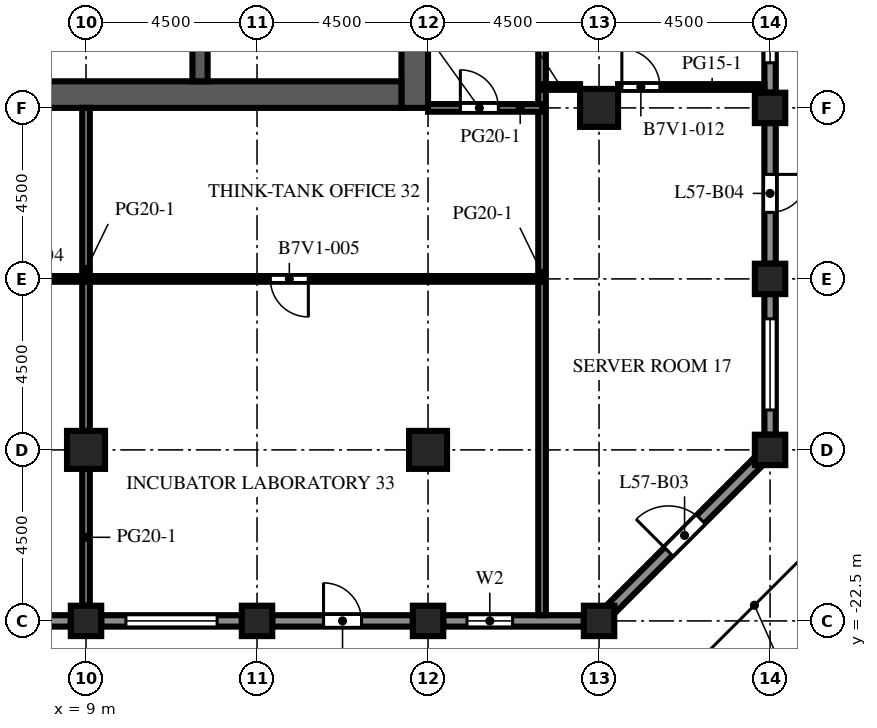
"""IFC4 building model, lengths in metres.
Left out: names, types, materials, properties, quantities, classifications, styles, units other than length and angle.
Written with IfcOpenShell. Run it as: python <this file> out.ifc"""

import sys

from ifc_helpers import new_model, si_unit, direction, frame, frame_2d, origin, origin_2d, place, context, subcontext, project, spatial, rectangle, extrude, element, fill, save


model = new_model("IFC4")
c1 = context("Model", 3, precision=1e-05, world=origin(), true_north=direction((0.0, 1.0)))
c2 = subcontext(c1, "Body", "Model", "MODEL_VIEW")
j1 = project(units=[si_unit("LENGTHUNIT", "METRE"), si_unit("PLANEANGLEUNIT", "RADIAN")], contexts=[c1])
p1 = place(None, origin())
s1 = spatial("IfcSite", under=j1, at=p1, CompositionType="ELEMENT")
p2 = place(p1, origin())
s2 = spatial("IfcBuilding", under=s1, at=p2, CompositionType="ELEMENT")
p3 = place(p2, frame((0.0, 0.0, 252.1)))
s3 = spatial("IfcBuildingStorey", under=s2, at=p3, CompositionType="ELEMENT", Elevation=252.1)
for number, where, z_axis, x_axis in (
    (1, (9.0, -22.5, 0.0), (0.0, 0.0, 1.0), (1.0, 0.0, 0.0)),
    (2, (13.5, -22.5, 0.0), (0.0, 0.0, 1.0), (1.0, 0.0, 0.0)),
    (3, (18.0, -22.5, 0.0), (0.0, 0.0, 1.0), (1.0, 0.0, 0.0)),
    (4, (22.5, -22.5, 0.0), (0.0, 0.0, 1.0), (1.0, 0.0, 0.0)),
    (5, (27.0, -18.0, 0.0), (0.0, 0.0, 1.0), (1.0, 0.0, 0.0)),
    (6, (27.0, -13.5, 0.0), (0.0, 0.0, 1.0), (1.0, 0.0, 0.0)),
    (7, (27.0, -9.0, 0.0), (0.0, 0.0, 1.0), (1.0, 0.0, 0.0)),
):
    element("IfcColumn", number, at=place(p3, frame(where, z_axis=z_axis, x_axis=x_axis)), inside=s3, PredefinedType="COLUMN", context=c2, shape_type="SweptSolid", body=[
        extrude(rectangle(XDim=0.8, YDim=0.8, at=origin_2d()), origin(), (0.0, 0.0, 1.0), 4.1),
    ])
for number, where, z_axis, x_axis in (
    (8, (9.0, -18.0, 0.0), (0.0, 0.0, 1.0), (1.0, 0.0, 0.0)),
    (9, (18.0, -18.0, 0.0), (0.0, 0.0, 1.0), (1.0, 0.0, 0.0)),
    (10, (22.5, -9.0, 0.0), (0.0, 0.0, 1.0), (1.0, 0.0, 0.0)),
):
    element("IfcColumn", number, at=place(p3, frame(where, z_axis=z_axis, x_axis=x_axis)), inside=s3, PredefinedType="COLUMN", context=c2, shape_type="SweptSolid", body=[
        extrude(rectangle(XDim=1.0, YDim=1.0, at=origin_2d()), origin(), (0.0, 0.0, 1.0), 4.1),
    ])
p4 = place(p3, frame((17.65, -9.0, 0.0), z_axis=(0.0, 0.0, 1.0), x_axis=(0.0, 1.0, 0.0)))
e11 = element("IfcWall", 11, at=p4, inside=s3, PredefinedType="SHEAR", context=c2, shape_type="SweptSolid", body=[
    extrude(rectangle(XDim=27.5, YDim=0.7, at=frame_2d((13.75, 0.0))), origin(), (0.0, 0.0, 1.0), 4.1),
])
p5 = place(p4, frame((12.55, 0.0, 0.0)))
e12 = element("IfcOpeningElement", 12, at=p5, cuts=e11, PredefinedType="OPENING", context=c2, shape_type="SweptSolid", body=[
    extrude(rectangle(XDim=2.4, YDim=2.4, at=frame_2d((1.2, 1.2))), frame((0.0, 0.36, 0.0), z_axis=(0.0, -1.0, 0.0), x_axis=(1.0, 0.0, 0.0)), (0.0, 0.0, 1.0), 0.72),
])
p6 = place(p4, frame((6.825, 0.0, 0.0)))
e13 = element("IfcOpeningElement", 13, at=p6, cuts=e11, PredefinedType="OPENING", context=c2, shape_type="SweptSolid", body=[
    extrude(rectangle(XDim=1.2, YDim=2.1, at=frame_2d((0.6, 1.05))), frame((0.0, 0.36, 0.0), z_axis=(0.0, -1.0, 0.0), x_axis=(1.0, 0.0, 0.0)), (0.0, 0.0, 1.0), 0.72),
])
p7 = place(p4, frame((19.475, 0.0, 0.0)))
e14 = element("IfcOpeningElement", 14, at=p7, cuts=e11, PredefinedType="OPENING", context=c2, shape_type="SweptSolid", body=[
    extrude(rectangle(XDim=1.2, YDim=2.1, at=frame_2d((0.6, 1.05))), frame((0.0, 0.36, 0.0), z_axis=(0.0, -1.0, 0.0), x_axis=(1.0, 0.0, 0.0)), (0.0, 0.0, 1.0), 0.72),
])
p8 = place(p3, frame((6.7, -8.65, 0.0), z_axis=(0.0, 0.0, 1.0), x_axis=(1.0, 0.0, 0.0)))
e15 = element("IfcWall", 15, at=p8, inside=s3, PredefinedType="SHEAR", context=c2, shape_type="SweptSolid", body=[
    extrude(rectangle(XDim=10.6, YDim=0.7, at=frame_2d((5.3, 0.0))), origin(), (0.0, 0.0, 1.0), 4.1),
])
p9 = place(p3, frame((12.0, -8.3, 0.0), z_axis=(0.0, 0.0, 1.0), x_axis=(0.0, 1.0, 0.0)))
e16 = element("IfcWall", 16, at=p9, inside=s3, PredefinedType="SHEAR", context=c2, shape_type="SweptSolid", body=[
    extrude(rectangle(XDim=7.6, YDim=0.4, at=frame_2d((3.8, 0.0))), origin(), (0.0, 0.0, 1.0), 4.1),
])
p10 = place(p3, frame((8.6, -22.5, 0.0), z_axis=(0.0, 0.0, 1.0), x_axis=(-1.0, 0.0, 0.0)))
e17 = element("IfcWall", 17, at=p10, inside=s3, PredefinedType="SOLIDWALL", context=c2, shape_type="SweptSolid", body=[
    extrude(rectangle(XDim=3.7, YDim=0.3, at=frame_2d((1.85, 0.0))), origin(), (0.0, 0.0, 1.0), 2.85),
])
p11 = place(p10, frame((0.65, 0.0, 0.8)))
e18 = element("IfcOpeningElement", 18, at=p11, cuts=e17, PredefinedType="OPENING", context=c2, shape_type="SweptSolid", body=[
    extrude(rectangle(XDim=2.4, YDim=1.7, at=frame_2d((1.2, 0.85))), frame((0.0, 0.16, 0.0), z_axis=(0.0, -1.0, 0.0), x_axis=(1.0, 0.0, 0.0)), (0.0, 0.0, 1.0), 0.32),
])
p12 = place(p3, frame((13.1, -22.5, 0.0), z_axis=(0.0, 0.0, 1.0), x_axis=(-1.0, 0.0, 0.0)))
e19 = element("IfcWall", 19, at=p12, inside=s3, PredefinedType="SOLIDWALL", context=c2, shape_type="SweptSolid", body=[
    extrude(rectangle(XDim=3.7, YDim=0.3, at=frame_2d((1.85, 0.0))), origin(), (0.0, 0.0, 1.0), 2.85),
])
p13 = place(p12, frame((0.65, 0.0, 0.8)))
e20 = element("IfcOpeningElement", 20, at=p13, cuts=e19, PredefinedType="OPENING", context=c2, shape_type="SweptSolid", body=[
    extrude(rectangle(XDim=2.4, YDim=1.7, at=frame_2d((1.2, 0.85))), frame((0.0, 0.16, 0.0), z_axis=(0.0, -1.0, 0.0), x_axis=(1.0, 0.0, 0.0)), (0.0, 0.0, 1.0), 0.32),
])
p14 = place(p3, frame((17.6, -22.5, 0.0), z_axis=(0.0, 0.0, 1.0), x_axis=(-1.0, 0.0, 0.0)))
e21 = element("IfcWall", 21, at=p14, inside=s3, PredefinedType="SOLIDWALL", context=c2, shape_type="SweptSolid", body=[
    extrude(rectangle(XDim=3.7, YDim=0.3, at=frame_2d((1.85, 0.0))), origin(), (0.0, 0.0, 1.0), 2.85),
])
p15 = place(p14, frame((1.35, 0.0, 0.0)))
e22 = element("IfcOpeningElement", 22, at=p15, cuts=e21, PredefinedType="OPENING", context=c2, shape_type="SweptSolid", body=[
    extrude(rectangle(XDim=1.0, YDim=2.2, at=frame_2d((0.5, 1.1))), frame((0.0, 0.16, 0.0), z_axis=(0.0, -1.0, 0.0), x_axis=(1.0, 0.0, 0.0)), (0.0, 0.0, 1.0), 0.32),
])
p16 = place(p3, frame((22.1, -22.5, 0.0), z_axis=(0.0, 0.0, 1.0), x_axis=(-1.0, 0.0, 0.0)))
e23 = element("IfcWall", 23, at=p16, inside=s3, PredefinedType="SOLIDWALL", context=c2, shape_type="SweptSolid", body=[
    extrude(rectangle(XDim=3.7, YDim=0.3, at=frame_2d((1.85, 0.0))), origin(), (0.0, 0.0, 1.0), 2.85),
])
p17 = place(p16, frame((1.875, 0.0, 0.8)))
e24 = element("IfcOpeningElement", 24, at=p17, cuts=e23, PredefinedType="OPENING", context=c2, shape_type="SweptSolid", body=[
    extrude(rectangle(XDim=1.2, YDim=1.7, at=frame_2d((0.6, 0.85))), frame((0.0, 0.16, 0.0), z_axis=(0.0, -1.0, 0.0), x_axis=(1.0, 0.0, 0.0)), (0.0, 0.0, 1.0), 0.32),
])
p18 = place(p3, frame((26.706, -18.294, 0.0), z_axis=(0.0, 0.0, 1.0), x_axis=(-0.707106781187, -0.707106781187, 0.0)))
e25 = element("IfcWall", 25, at=p18, inside=s3, PredefinedType="SOLIDWALL", context=c2, shape_type="SweptSolid", body=[
    extrude(rectangle(XDim=5.532, YDim=0.3, at=frame_2d((2.766, 0.0))), origin(), (0.0, 0.0, 1.0), 2.85),
])
p19 = place(p18, frame((2.166, 0.0, 0.0)))
e26 = element("IfcOpeningElement", 26, at=p19, cuts=e25, PredefinedType="OPENING", context=c2, shape_type="SweptSolid", body=[
    extrude(rectangle(XDim=1.2, YDim=2.2, at=frame_2d((0.6, 1.1))), frame((0.0, 0.16, 0.0), z_axis=(0.0, -1.0, 0.0), x_axis=(1.0, 0.0, 0.0)), (0.0, 0.0, 1.0), 0.32),
])
p20 = place(p3, frame((27.0, -13.9, 0.0), z_axis=(0.0, 0.0, 1.0), x_axis=(0.0, -1.0, 0.0)))
e27 = element("IfcWall", 27, at=p20, inside=s3, PredefinedType="SOLIDWALL", context=c2, shape_type="SweptSolid", body=[
    extrude(rectangle(XDim=3.7, YDim=0.3, at=frame_2d((1.85, 0.0))), origin(), (0.0, 0.0, 1.0), 2.85),
])
p21 = place(p20, frame((0.65, 0.0, 0.8)))
e28 = element("IfcOpeningElement", 28, at=p21, cuts=e27, PredefinedType="OPENING", context=c2, shape_type="SweptSolid", body=[
    extrude(rectangle(XDim=2.4, YDim=1.7, at=frame_2d((1.2, 0.85))), frame((0.0, 0.16, 0.0), z_axis=(0.0, -1.0, 0.0), x_axis=(1.0, 0.0, 0.0)), (0.0, 0.0, 1.0), 0.32),
])
p22 = place(p3, frame((27.0, -9.4, 0.0), z_axis=(0.0, 0.0, 1.0), x_axis=(0.0, -1.0, 0.0)))
e29 = element("IfcWall", 29, at=p22, inside=s3, PredefinedType="SOLIDWALL", context=c2, shape_type="SweptSolid", body=[
    extrude(rectangle(XDim=3.7, YDim=0.3, at=frame_2d((1.85, 0.0))), origin(), (0.0, 0.0, 1.0), 2.85),
])
p23 = place(p22, frame((1.35, 0.0, 0.0)))
e30 = element("IfcOpeningElement", 30, at=p23, cuts=e29, PredefinedType="OPENING", context=c2, shape_type="SweptSolid", body=[
    extrude(rectangle(XDim=1.0, YDim=2.2, at=frame_2d((0.5, 1.1))), frame((0.0, 0.16, 0.0), z_axis=(0.0, -1.0, 0.0), x_axis=(1.0, 0.0, 0.0)), (0.0, 0.0, 1.0), 0.32),
])
p24 = place(p3, frame((27.0, -4.9, 0.0), z_axis=(0.0, 0.0, 1.0), x_axis=(0.0, -1.0, 0.0)))
e31 = element("IfcWall", 31, at=p24, inside=s3, PredefinedType="SOLIDWALL", context=c2, shape_type="SweptSolid", body=[
    extrude(rectangle(XDim=3.7, YDim=0.3, at=frame_2d((1.85, 0.0))), origin(), (0.0, 0.0, 1.0), 2.85),
])
p25 = place(p24, frame((0.512, 0.0, 0.8)))
e32 = element("IfcOpeningElement", 32, at=p25, cuts=e31, PredefinedType="OPENING", context=c2, shape_type="SweptSolid", body=[
    extrude(rectangle(XDim=2.4, YDim=1.7, at=frame_2d((1.2, 0.85))), frame((0.0, 0.16, 0.0), z_axis=(0.0, -1.0, 0.0), x_axis=(1.0, 0.0, 0.0)), (0.0, 0.0, 1.0), 0.32),
])
p26 = place(p3, frame((8.2, -8.3, 0.0), z_axis=(0.0, 0.0, 1.0), x_axis=(0.0, 1.0, 0.0)))
e33 = element("IfcWall", 33, at=p26, inside=s3, PredefinedType="PARTITIONING", context=c2, shape_type="SweptSolid", body=[
    extrude(rectangle(XDim=2.584, YDim=0.1, at=frame_2d((1.292, 0.0))), origin(), (0.0, 0.0, 1.0), 3.65),
])
p27 = place(p26, frame((0.792, 0.0, 0.0)))
e34 = element("IfcOpeningElement", 34, at=p27, cuts=e33, PredefinedType="OPENING", context=c2, shape_type="SweptSolid", body=[
    extrude(rectangle(XDim=1.0, YDim=2.1, at=frame_2d((0.5, 1.05))), frame((0.0, 0.06, 0.0), z_axis=(0.0, -1.0, 0.0), x_axis=(1.0, 0.0, 0.0)), (0.0, 0.0, 1.0), 0.12),
])
p28 = place(p3, frame((9.0, -22.1, 0.0), z_axis=(0.0, 0.0, 1.0), x_axis=(0.0, 1.0, 0.0)))
e35 = element("IfcWall", 35, at=p28, inside=s3, PredefinedType="PARTITIONING", context=c2, shape_type="SweptSolid", body=[
    extrude(rectangle(XDim=3.6, YDim=0.2, at=frame_2d((1.8, 0.0))), origin(), (0.0, 0.0, 1.0), 3.65),
])
p29 = place(p3, frame((9.0, -17.5, 0.0), z_axis=(0.0, 0.0, 1.0), x_axis=(0.0, 1.0, 0.0)))
e36 = element("IfcWall", 36, at=p29, inside=s3, PredefinedType="PARTITIONING", context=c2, shape_type="SweptSolid", body=[
    extrude(rectangle(XDim=8.5, YDim=0.2, at=frame_2d((4.25, 0.0))), origin(), (0.0, 0.0, 1.0), 3.65),
])
p30 = place(p3, frame((21.0, 3.25, 0.0), z_axis=(0.0, 0.0, 1.0), x_axis=(0.0, -1.0, 0.0)))
e37 = element("IfcWall", 37, at=p30, inside=s3, PredefinedType="PARTITIONING", context=c2, shape_type="SweptSolid", body=[
    extrude(rectangle(XDim=25.6, YDim=0.2, at=frame_2d((12.8, 0.0))), origin(), (0.0, 0.0, 1.0), 3.65),
])
p31 = place(p30, frame((6.6, 0.0, 0.0)))
e38 = element("IfcOpeningElement", 38, at=p31, cuts=e37, PredefinedType="OPENING", context=c2, shape_type="SweptSolid", body=[
    extrude(rectangle(XDim=1.0, YDim=2.1, at=frame_2d((0.5, 1.05))), frame((0.0, 0.11, 0.0), z_axis=(0.0, -1.0, 0.0), x_axis=(1.0, 0.0, 0.0)), (0.0, 0.0, 1.0), 0.22),
])
p32 = place(p3, frame((21.0, -13.5, 0.0), z_axis=(0.0, 0.0, 1.0), x_axis=(-1.0, 0.0, 0.0)))
e39 = element("IfcWall", 39, at=p32, inside=s3, PredefinedType="PARTITIONING", context=c2, shape_type="SweptSolid", body=[
    extrude(rectangle(XDim=34.5, YDim=0.15, at=frame_2d((17.25, 0.0))), origin(), (0.0, 0.0, 1.0), 3.65),
])
p33 = place(p32, frame((31.65, 0.0, 0.0)))
e40 = element("IfcOpeningElement", 40, at=p33, cuts=e39, PredefinedType="OPENING", context=c2, shape_type="SweptSolid", body=[
    extrude(rectangle(XDim=1.0, YDim=2.1, at=frame_2d((0.5, 1.05))), frame((0.0, 0.085, 0.0), z_axis=(0.0, -1.0, 0.0), x_axis=(1.0, 0.0, 0.0)), (0.0, 0.0, 1.0), 0.17),
])
p34 = place(p32, frame((22.15, 0.0, 0.0)))
e41 = element("IfcOpeningElement", 41, at=p34, cuts=e39, PredefinedType="OPENING", context=c2, shape_type="SweptSolid", body=[
    extrude(rectangle(XDim=1.0, YDim=2.1, at=frame_2d((0.5, 1.05))), frame((0.0, 0.085, 0.0), z_axis=(0.0, -1.0, 0.0), x_axis=(1.0, 0.0, 0.0)), (0.0, 0.0, 1.0), 0.17),
])
p35 = place(p32, frame((13.15, 0.0, 0.0)))
e42 = element("IfcOpeningElement", 42, at=p35, cuts=e39, PredefinedType="OPENING", context=c2, shape_type="SweptSolid", body=[
    extrude(rectangle(XDim=1.0, YDim=2.1, at=frame_2d((0.5, 1.05))), frame((0.0, 0.085, 0.0), z_axis=(0.0, -1.0, 0.0), x_axis=(1.0, 0.0, 0.0)), (0.0, 0.0, 1.0), 0.17),
])
p36 = place(p32, frame((6.15, 0.0, 0.0)))
e43 = element("IfcOpeningElement", 43, at=p36, cuts=e39, PredefinedType="OPENING", context=c2, shape_type="SweptSolid", body=[
    extrude(rectangle(XDim=1.0, YDim=2.1, at=frame_2d((0.5, 1.05))), frame((0.0, 0.085, 0.0), z_axis=(0.0, -1.0, 0.0), x_axis=(1.0, 0.0, 0.0)), (0.0, 0.0, 1.0), 0.17),
])
p37 = place(p3, frame((21.0, -9.0, 0.0), z_axis=(0.0, 0.0, 1.0), x_axis=(-1.0, 0.0, 0.0)))
e44 = element("IfcWall", 44, at=p37, inside=s3, PredefinedType="PARTITIONING", context=c2, shape_type="SweptSolid", body=[
    extrude(rectangle(XDim=3.0, YDim=0.2, at=frame_2d((1.5, 0.0))), origin(), (0.0, 0.0, 1.0), 3.65),
])
p38 = place(p37, frame((1.15, 0.0, 0.0)))
e45 = element("IfcOpeningElement", 45, at=p38, cuts=e44, PredefinedType="OPENING", context=c2, shape_type="SweptSolid", body=[
    extrude(rectangle(XDim=1.0, YDim=2.1, at=frame_2d((0.5, 1.05))), frame((0.0, 0.11, 0.0), z_axis=(0.0, -1.0, 0.0), x_axis=(1.0, 0.0, 0.0)), (0.0, 0.0, 1.0), 0.22),
])
p39 = place(p3, frame((21.0, -8.45, 0.0), z_axis=(0.0, 0.0, 1.0), x_axis=(1.0, 0.0, 0.0)))
e46 = element("IfcWall", 46, at=p39, inside=s3, PredefinedType="PARTITIONING", context=c2, shape_type="SweptSolid", body=[
    extrude(rectangle(XDim=1.0, YDim=0.15, at=frame_2d((0.5, 0.0))), origin(), (0.0, 0.0, 1.0), 3.65),
])
p40 = place(p3, frame((26.85, -8.45, 0.0), z_axis=(0.0, 0.0, 1.0), x_axis=(-1.0, 0.0, 0.0)))
e47 = element("IfcWall", 47, at=p40, inside=s3, PredefinedType="PARTITIONING", context=c2, shape_type="SweptSolid", body=[
    extrude(rectangle(XDim=3.85, YDim=0.15, at=frame_2d((1.925, 0.0))), origin(), (0.0, 0.0, 1.0), 3.65),
])
p41 = place(p40, frame((2.75, 0.0, 0.0)))
e48 = element("IfcOpeningElement", 48, at=p41, cuts=e47, PredefinedType="OPENING", context=c2, shape_type="SweptSolid", body=[
    extrude(rectangle(XDim=1.0, YDim=2.1, at=frame_2d((0.5, 1.05))), frame((0.0, 0.085, 0.0), z_axis=(0.0, -1.0, 0.0), x_axis=(1.0, 0.0, 0.0)), (0.0, 0.0, 1.0), 0.17),
])
p42 = place(p13, origin())
e49 = element("IfcWindow", 49, at=p42, inside=s3, PartitioningType="SINGLE_PANEL", PredefinedType="WINDOW", context=c2, shape_type="SweptSolid", body=[
    extrude(rectangle(XDim=2.4, YDim=1.7, at=frame_2d((1.2, 0.85))), frame((0.0, 0.03, 0.0), z_axis=(0.0, -1.0, 0.0), x_axis=(1.0, 0.0, 0.0)), (0.0, 0.0, 1.0), 0.06),
])
fill(e20, e49)
p43 = place(p15, origin())
e50 = element("IfcDoor", 50, at=p43, inside=s3, OperationType="SINGLE_SWING_RIGHT", PredefinedType="DOOR", context=c2, shape_type="SweptSolid", body=[
    extrude(rectangle(XDim=1.0, YDim=2.2, at=frame_2d((0.5, 1.1))), frame((0.0, 0.025, 0.0), z_axis=(0.0, -1.0, 0.0), x_axis=(1.0, 0.0, 0.0)), (0.0, 0.0, 1.0), 0.05),
])
fill(e22, e50)
p44 = place(p17, origin())
e51 = element("IfcWindow", 51, at=p44, inside=s3, PartitioningType="SINGLE_PANEL", PredefinedType="WINDOW", context=c2, shape_type="SweptSolid", body=[
    extrude(rectangle(XDim=1.2, YDim=1.7, at=frame_2d((0.6, 0.85))), frame((0.0, 0.03, 0.0), z_axis=(0.0, -1.0, 0.0), x_axis=(1.0, 0.0, 0.0)), (0.0, 0.0, 1.0), 0.06),
])
fill(e24, e51)
p45 = place(p19, origin())
e52 = element("IfcDoor", 52, at=p45, inside=s3, OperationType="SINGLE_SWING_RIGHT", PredefinedType="DOOR", context=c2, shape_type="SweptSolid", body=[
    extrude(rectangle(XDim=1.2, YDim=2.2, at=frame_2d((0.6, 1.1))), frame((0.0, 0.025, 0.0), z_axis=(0.0, -1.0, 0.0), x_axis=(1.0, 0.0, 0.0)), (0.0, 0.0, 1.0), 0.05),
])
fill(e26, e52)
p46 = place(p21, origin())
e53 = element("IfcWindow", 53, at=p46, inside=s3, PartitioningType="SINGLE_PANEL", PredefinedType="WINDOW", context=c2, shape_type="SweptSolid", body=[
    extrude(rectangle(XDim=2.4, YDim=1.7, at=frame_2d((1.2, 0.85))), frame((0.0, 0.03, 0.0), z_axis=(0.0, -1.0, 0.0), x_axis=(1.0, 0.0, 0.0)), (0.0, 0.0, 1.0), 0.06),
])
fill(e28, e53)
p47 = place(p23, origin())
e54 = element("IfcDoor", 54, at=p47, inside=s3, OperationType="SINGLE_SWING_LEFT", PredefinedType="DOOR", context=c2, shape_type="SweptSolid", body=[
    extrude(rectangle(XDim=1.0, YDim=2.2, at=frame_2d((0.5, 1.1))), frame((0.0, 0.025, 0.0), z_axis=(0.0, -1.0, 0.0), x_axis=(1.0, 0.0, 0.0)), (0.0, 0.0, 1.0), 0.05),
])
fill(e30, e54)
p48 = place(p25, origin())
e55 = element("IfcWindow", 55, at=p48, inside=s3, PartitioningType="SINGLE_PANEL", PredefinedType="WINDOW", context=c2, shape_type="SweptSolid", body=[
    extrude(rectangle(XDim=2.4, YDim=1.7, at=frame_2d((1.2, 0.85))), frame((0.0, 0.03, 0.0), z_axis=(0.0, -1.0, 0.0), x_axis=(1.0, 0.0, 0.0)), (0.0, 0.0, 1.0), 0.06),
])
fill(e32, e55)
p49 = place(p36, origin())
e56 = element("IfcDoor", 56, at=p49, inside=s3, OperationType="SINGLE_SWING_LEFT", PredefinedType="DOOR", context=c2, shape_type="SweptSolid", body=[
    extrude(rectangle(XDim=1.0, YDim=2.1, at=frame_2d((0.5, 1.05))), frame((0.0, 0.025, 0.0), z_axis=(0.0, -1.0, 0.0), x_axis=(1.0, 0.0, 0.0)), (0.0, 0.0, 1.0), 0.05),
])
fill(e43, e56)
p50 = place(p38, origin())
e57 = element("IfcDoor", 57, at=p50, inside=s3, OperationType="SINGLE_SWING_RIGHT", PredefinedType="DOOR", context=c2, shape_type="SweptSolid", body=[
    extrude(rectangle(XDim=1.0, YDim=2.1, at=frame_2d((0.5, 1.05))), frame((0.0, 0.025, 0.0), z_axis=(0.0, -1.0, 0.0), x_axis=(1.0, 0.0, 0.0)), (0.0, 0.0, 1.0), 0.05),
])
fill(e45, e57)
p51 = place(p41, origin())
e58 = element("IfcDoor", 58, at=p51, inside=s3, OperationType="SINGLE_SWING_RIGHT", PredefinedType="DOOR", context=c2, shape_type="SweptSolid", body=[
    extrude(rectangle(XDim=1.0, YDim=2.1, at=frame_2d((0.5, 1.05))), frame((0.0, 0.025, 0.0), z_axis=(0.0, -1.0, 0.0), x_axis=(1.0, 0.0, 0.0)), (0.0, 0.0, 1.0), 0.05),
])
fill(e48, e58)
save(model, sys.argv[1])
